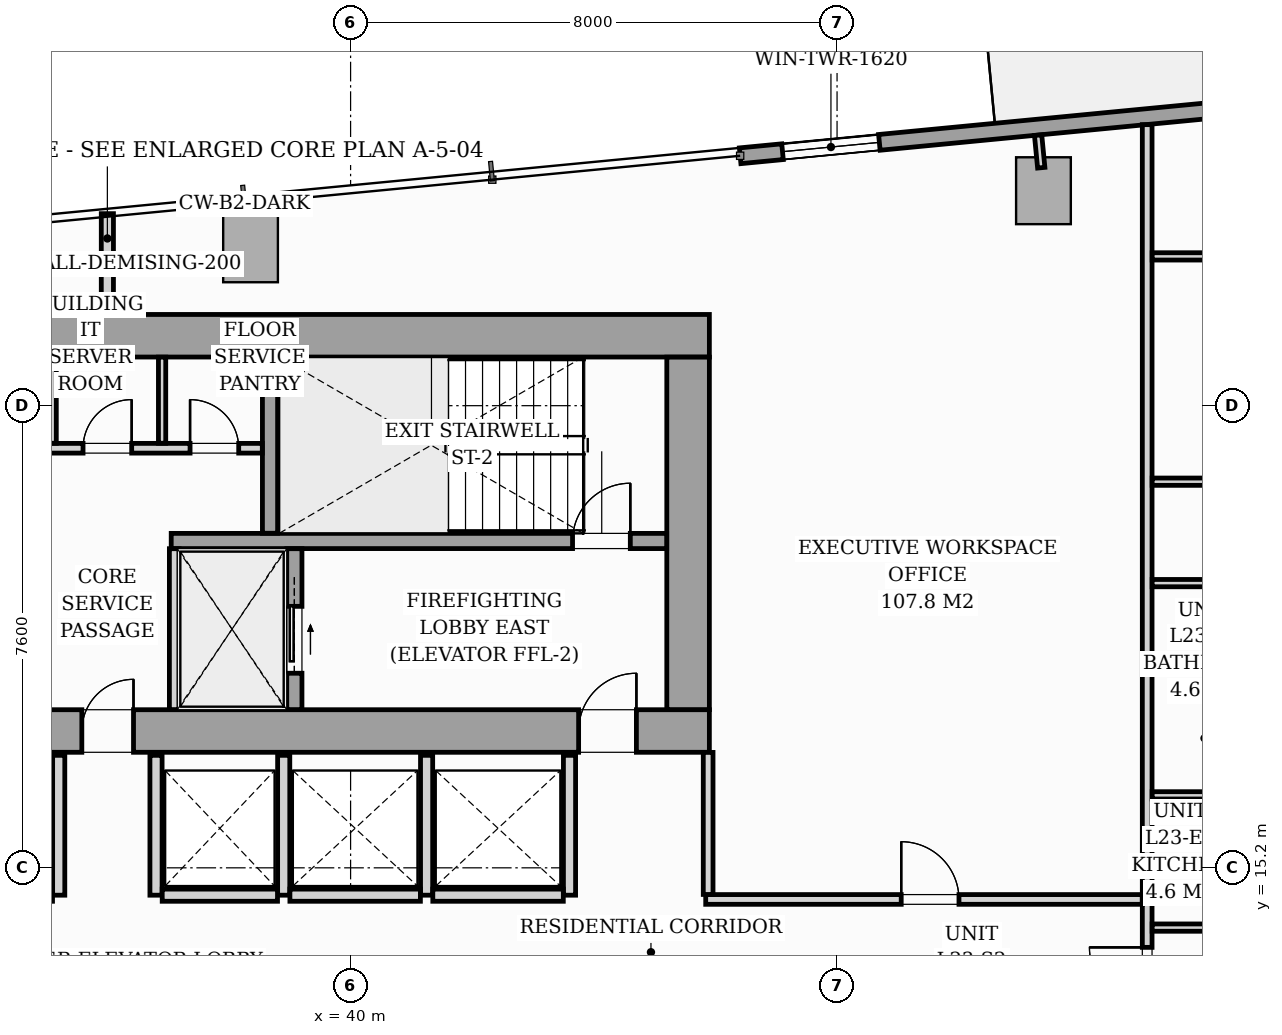
"""IFC4 building model, lengths in metres.
Left out: names, types, materials, properties, quantities, classifications, styles, units other than length and angle.
Written with IfcOpenShell. Run it as: python <this file> out.ifc"""

import sys

from ifc_helpers import new_model, si_unit, direction, frame, frame_2d, origin, origin_2d, place, context, subcontext, project, spatial, rectangle, i_section, extrude, source, transform, mapped, element, fill, save


model = new_model("IFC4")
c1 = context("Model", 3, precision=1e-05, world=origin(), true_north=direction((0.0, 1.0)))
c2 = subcontext(c1, "Body", "Model", "MODEL_VIEW")
j1 = project(units=[si_unit("LENGTHUNIT", "METRE"), si_unit("PLANEANGLEUNIT", "RADIAN")], contexts=[c1])
p1 = place(None, origin())
s1 = spatial("IfcSite", under=j1, at=p1, CompositionType="ELEMENT")
p2 = place(p1, origin())
s2 = spatial("IfcBuilding", under=s1, at=p2, CompositionType="ELEMENT")
p3 = place(p2, frame((0.0, 0.0, 84.2)))
s3 = spatial("IfcBuildingStorey", under=s2, at=p3, CompositionType="ELEMENT", Elevation=84.2)
m1 = source(origin(), c2, "Body", "SweptSolid", [
    extrude(i_section(OverallWidth=0.427, OverallDepth=0.483, WebThickness=0.051, FlangeThickness=0.082, FilletRadius=0.018, at=origin_2d()), origin(), (0.0, 0.0, 1.0), 3.196),
])
for number, where, z_axis, x_axis in (
    (1, (38.88, 17.4, 0.002), (0.0, 0.0, 1.0), (1.0, 0.0, 0.0)),
    (2, (45.6, 17.4, 0.002), (0.0, 0.0, 1.0), (1.0, 0.0, 0.0)),
    (3, (38.88, 24.0, 0.002), (0.0, 0.0, 1.0), (1.0, 0.0, 0.0)),
    (4, (45.6, 24.0, 0.002), (0.0, 0.0, 1.0), (1.0, 0.0, 0.0)),
):
    element("IfcColumn", number, at=place(p3, frame(where, z_axis=z_axis, x_axis=x_axis)), inside=s3, PredefinedType="PILASTER", context=c2, shape_type="MappedRepresentation", body=[
        mapped(m1, transform((0.0, 0.0, 0.0), scale=1.0)),
    ])
m2 = source(origin(), c2, "Body", "SweptSolid", [
    extrude(rectangle(XDim=0.9, YDim=1.1, at=origin_2d()), origin(), (0.0, 0.0, 1.0), 3.196),
])
for number, where, z_axis, x_axis in (
    (5, (38.354, 25.38, 0.002), (0.0, 0.0, 1.0), (0.995, 0.096, 0.0)),
    (6, (51.394, 26.335, 0.002), (0.0, 0.0, 1.0), (0.995, 0.096, 0.0)),
):
    element("IfcColumn", number, at=place(p3, frame(where, z_axis=z_axis, x_axis=x_axis)), inside=s3, PredefinedType="COLUMN", context=c2, shape_type="MappedRepresentation", body=[
        mapped(m2, transform((0.0, 0.0, 0.0), scale=1.0)),
    ])
p4 = place(p3, frame((46.406, 26.91, 0.0), z_axis=(0.0, 0.0, 1.0), x_axis=(0.995396638587, 0.095841180552, 0.0)))
e7 = element("IfcWall", 7, at=p4, inside=s3, PredefinedType="STANDARD", context=c2, shape_type="SweptSolid", body=[
    extrude(rectangle(XDim=19.11, YDim=0.26, at=frame_2d((9.555, 0.0))), origin(), (0.0, 0.0, 1.0), 2.94),
])
p5 = place(p4, frame((9.6, 0.0, 0.0)))
e8 = element("IfcOpeningElement", 8, at=p5, cuts=e7, PredefinedType="OPENING", context=c2, shape_type="SweptSolid", body=[
    extrude(rectangle(XDim=1.8, YDim=2.06, at=frame_2d((0.9, 1.03))), frame((0.0, 0.14, 0.0), z_axis=(0.0, -1.0, 0.0), x_axis=(1.0, 0.0, 0.0)), (0.0, 0.0, 1.0), 0.28),
])
p6 = place(p4, frame((0.7, 0.0, 0.65)))
e9 = element("IfcOpeningElement", 9, at=p6, cuts=e7, PredefinedType="OPENING", context=c2, shape_type="SweptSolid", body=[
    extrude(rectangle(XDim=1.6, YDim=1.5, at=frame_2d((0.8, 0.75))), frame((0.0, 0.14, 0.0), z_axis=(0.0, -1.0, 0.0), x_axis=(1.0, 0.0, 0.0)), (0.0, 0.0, 1.0), 0.28),
])
p7 = place(p3, frame((26.1, 17.45, 0.0), z_axis=(0.0, 0.0, 1.0), x_axis=(1.0, 0.0, 0.0)))
e10 = element("IfcWall", 10, at=p7, inside=s3, PredefinedType="SHEAR", context=c2, shape_type="SweptSolid", body=[
    extrude(rectangle(XDim=19.8, YDim=0.7, at=frame_2d((9.9, 0.0))), origin(), (0.0, 0.0, 1.0), 3.2),
])
p8 = place(p7, frame((1.05, 0.0, 0.0)))
e11 = element("IfcOpeningElement", 11, at=p8, cuts=e10, PredefinedType="OPENING", context=c2, shape_type="SweptSolid", body=[
    extrude(rectangle(XDim=0.95, YDim=2.06, at=frame_2d((0.475, 1.03))), frame((0.0, 0.36, 0.0), z_axis=(0.0, -1.0, 0.0), x_axis=(1.0, 0.0, 0.0)), (0.0, 0.0, 1.0), 0.72),
])
p9 = place(p7, frame((9.48, 0.0, 0.0)))
e12 = element("IfcOpeningElement", 12, at=p9, cuts=e10, PredefinedType="OPENING", context=c2, shape_type="SweptSolid", body=[
    extrude(rectangle(XDim=0.85, YDim=2.0, at=frame_2d((0.425, 1.0))), frame((0.0, 0.36, 0.0), z_axis=(0.0, -1.0, 0.0), x_axis=(1.0, 0.0, 0.0)), (0.0, 0.0, 1.0), 0.72),
])
p10 = place(p7, frame((17.65, 0.0, 0.0)))
e13 = element("IfcOpeningElement", 13, at=p10, cuts=e10, PredefinedType="OPENING", context=c2, shape_type="SweptSolid", body=[
    extrude(rectangle(XDim=0.95, YDim=2.06, at=frame_2d((0.475, 1.03))), frame((0.0, 0.36, 0.0), z_axis=(0.0, -1.0, 0.0), x_axis=(1.0, 0.0, 0.0)), (0.0, 0.0, 1.0), 0.72),
])
p11 = place(p3, frame((26.1, 23.95, 0.0), z_axis=(0.0, 0.0, 1.0), x_axis=(1.0, 0.0, 0.0)))
e14 = element("IfcWall", 14, at=p11, inside=s3, PredefinedType="SHEAR", context=c2, shape_type="SweptSolid", body=[
    extrude(rectangle(XDim=19.8, YDim=0.7, at=frame_2d((9.9, 0.0))), origin(), (0.0, 0.0, 1.0), 3.2),
])
p12 = place(p3, frame((45.55, 17.802, 0.0), z_axis=(0.0, 0.0, 1.0), x_axis=(0.0, 1.0, 0.0)))
e15 = element("IfcWall", 15, at=p12, inside=s3, PredefinedType="SHEAR", context=c2, shape_type="SweptSolid", body=[
    extrude(rectangle(XDim=5.796, YDim=0.7, at=frame_2d((2.898, 0.0))), origin(), (0.0, 0.0, 1.0), 3.2),
])
p13 = place(p3, frame((37.05, 20.575, 0.0), z_axis=(0.0, 0.0, 1.0), x_axis=(1.0, 0.0, 0.0)))
e16 = element("IfcWall", 16, at=p13, inside=s3, PredefinedType="SOLIDWALL", context=c2, shape_type="SweptSolid", body=[
    extrude(rectangle(XDim=8.148, YDim=0.25, at=frame_2d((4.074, 0.0))), origin(), (0.0, 0.0, 1.0), 3.2),
])
p14 = place(p13, frame((6.6, 0.0, 0.0)))
e17 = element("IfcOpeningElement", 17, at=p14, cuts=e16, PredefinedType="OPENING", context=c2, shape_type="SweptSolid", body=[
    extrude(rectangle(XDim=0.95, YDim=2.06, at=frame_2d((0.475, 1.03))), frame((0.0, 0.135, 0.0), z_axis=(0.0, -1.0, 0.0), x_axis=(1.0, 0.0, 0.0)), (0.0, 0.0, 1.0), 0.27),
])
p15 = place(p3, frame((38.675, 20.702, 0.0), z_axis=(0.0, 0.0, 1.0), x_axis=(0.0, 1.0, 0.0)))
e18 = element("IfcWall", 18, at=p15, inside=s3, PredefinedType="SOLIDWALL", context=c2, shape_type="SweptSolid", body=[
    extrude(rectangle(XDim=2.896, YDim=0.25, at=frame_2d((1.448, 0.0))), origin(), (0.0, 0.0, 1.0), 3.2),
])
p16 = place(p3, frame((37.1, 17.802, 0.0), z_axis=(0.0, 0.0, 1.0), x_axis=(0.0, 1.0, 0.0)))
e19 = element("IfcWall", 19, at=p16, inside=s3, PredefinedType="PARTITIONING", context=c2, shape_type="SweptSolid", body=[
    extrude(rectangle(XDim=2.646, YDim=0.16, at=frame_2d((1.323, 0.0))), origin(), (0.0, 0.0, 1.0), 2.94),
])
p17 = place(p3, frame((39.075, 17.802, 0.0), z_axis=(0.0, 0.0, 1.0), x_axis=(0.0, 1.0, 0.0)))
e20 = element("IfcWall", 20, at=p17, inside=s3, PredefinedType="SOLIDWALL", context=c2, shape_type="SweptSolid", body=[
    extrude(rectangle(XDim=2.646, YDim=0.25, at=frame_2d((1.323, 0.0))), origin(), (0.0, 0.0, 1.0), 3.2),
])
p18 = place(p17, frame((0.598, 0.0, 0.0)))
e21 = element("IfcOpeningElement", 21, at=p18, cuts=e20, PredefinedType="OPENING", context=c2, shape_type="SweptSolid", body=[
    extrude(rectangle(XDim=1.1, YDim=2.08, at=frame_2d((0.55, 1.04))), frame((0.0, 0.135, 0.0), z_axis=(0.0, -1.0, 0.0), x_axis=(1.0, 0.0, 0.0)), (0.0, 0.0, 1.0), 0.27),
])
p19 = place(p3, frame((33.452, 22.1, 0.0), z_axis=(0.0, 0.0, 1.0), x_axis=(1.0, 0.0, 0.0)))
e22 = element("IfcWall", 22, at=p19, inside=s3, PredefinedType="PARTITIONING", context=c2, shape_type="SweptSolid", body=[
    extrude(rectangle(XDim=5.096, YDim=0.16, at=frame_2d((2.548, 0.0))), origin(), (0.0, 0.0, 1.0), 2.94),
])
p20 = place(p19, frame((0.388, 0.0, 0.0)))
e23 = element("IfcOpeningElement", 23, at=p20, cuts=e22, PredefinedType="OPENING", context=c2, shape_type="SweptSolid", body=[
    extrude(rectangle(XDim=0.8, YDim=2.05, at=frame_2d((0.4, 1.025))), frame((0.0, 0.09, 0.0), z_axis=(0.0, -1.0, 0.0), x_axis=(1.0, 0.0, 0.0)), (0.0, 0.0, 1.0), 0.18),
])
p21 = place(p19, frame((2.148, 0.0, 0.0)))
e24 = element("IfcOpeningElement", 24, at=p21, cuts=e22, PredefinedType="OPENING", context=c2, shape_type="SweptSolid", body=[
    extrude(rectangle(XDim=0.8, YDim=2.05, at=frame_2d((0.4, 1.025))), frame((0.0, 0.09, 0.0), z_axis=(0.0, -1.0, 0.0), x_axis=(1.0, 0.0, 0.0)), (0.0, 0.0, 1.0), 0.18),
])
p22 = place(p19, frame((3.908, 0.0, 0.0)))
e25 = element("IfcOpeningElement", 25, at=p22, cuts=e22, PredefinedType="OPENING", context=c2, shape_type="SweptSolid", body=[
    extrude(rectangle(XDim=0.8, YDim=2.05, at=frame_2d((0.4, 1.025))), frame((0.0, 0.09, 0.0), z_axis=(0.0, -1.0, 0.0), x_axis=(1.0, 0.0, 0.0)), (0.0, 0.0, 1.0), 0.18),
])
for number, where, z_axis, x_axis in (
    (26, (35.1, 22.182, 0.0), (0.0, 0.0, 1.0), (0.0, 1.0, 0.0)),
    (27, (36.9, 22.182, 0.0), (0.0, 0.0, 1.0), (0.0, 1.0, 0.0)),
):
    element("IfcWall", number, at=place(p3, frame(where, z_axis=z_axis, x_axis=x_axis)), inside=s3, PredefinedType="PARTITIONING", context=c2, shape_type="SweptSolid", body=[
        extrude(rectangle(XDim=1.416, YDim=0.12, at=frame_2d((0.708, 0.0))), origin(), (0.0, 0.0, 1.0), 2.94),
    ])
for number, where, z_axis, x_axis in (
    (28, (35.2, 14.75, 0.0), (0.0, 0.0, 1.0), (0.0, 1.0, 0.0)),
    (29, (36.8, 14.75, 0.0), (0.0, 0.0, 1.0), (0.0, 1.0, 0.0)),
    (30, (38.9, 14.75, 0.0), (0.0, 0.0, 1.0), (0.0, 1.0, 0.0)),
):
    element("IfcWall", number, at=place(p3, frame(where, z_axis=z_axis, x_axis=x_axis)), inside=s3, PredefinedType="PARTITIONING", context=c2, shape_type="SweptSolid", body=[
        extrude(rectangle(XDim=2.3, YDim=0.2, at=frame_2d((1.15, 0.0))), origin(), (0.0, 0.0, 1.0), 2.94),
    ])
p23 = place(p3, frame((36.902, 14.75, 0.0), z_axis=(0.0, 0.0, 1.0), x_axis=(1.0, 0.0, 0.0)))
e31 = element("IfcWall", 31, at=p23, inside=s3, PredefinedType="PARTITIONING", context=c2, shape_type="SweptSolid", body=[
    extrude(rectangle(XDim=1.896, YDim=0.2, at=frame_2d((0.948, 0.0))), origin(), (0.0, 0.0, 1.0), 2.94),
])
for number, where, z_axis, x_axis in (
    (32, (41.25, 14.75, 0.0), (0.0, 0.0, 1.0), (0.0, 1.0, 0.0)),
    (33, (43.6, 14.75, 0.0), (0.0, 0.0, 1.0), (0.0, 1.0, 0.0)),
):
    element("IfcWall", number, at=place(p3, frame(where, z_axis=z_axis, x_axis=x_axis)), inside=s3, PredefinedType="PARTITIONING", context=c2, shape_type="SweptSolid", body=[
        extrude(rectangle(XDim=2.3, YDim=0.2, at=frame_2d((1.15, 0.0))), origin(), (0.0, 0.0, 1.0), 2.94),
    ])
for number, where, z_axis, x_axis in (
    (34, (39.002, 14.75, 0.0), (0.0, 0.0, 1.0), (1.0, 0.0, 0.0)),
    (35, (41.352, 14.75, 0.0), (0.0, 0.0, 1.0), (1.0, 0.0, 0.0)),
):
    element("IfcWall", number, at=place(p3, frame(where, z_axis=z_axis, x_axis=x_axis)), inside=s3, PredefinedType="PARTITIONING", context=c2, shape_type="SweptSolid", body=[
        extrude(rectangle(XDim=2.146, YDim=0.2, at=frame_2d((1.073, 0.0))), origin(), (0.0, 0.0, 1.0), 2.94),
    ])
p24 = place(p3, frame((53.1, 12.572, 0.0), z_axis=(0.0, 0.0, 1.0), x_axis=(0.0, 1.0, 0.0)))
e36 = element("IfcWall", 36, at=p24, inside=s3, PredefinedType="PARTITIONING", context=c2, shape_type="SweptSolid", body=[
    extrude(rectangle(XDim=14.849, YDim=0.16, at=frame_2d((7.425, 0.0))), origin(), (0.0, 0.0, 1.0), 2.94),
])
p25 = place(p24, frame((0.37, 0.0, 0.0)))
e37 = element("IfcOpeningElement", 37, at=p25, cuts=e36, PredefinedType="OPENING", context=c2, shape_type="SweptSolid", body=[
    extrude(rectangle(XDim=0.95, YDim=2.06, at=frame_2d((0.475, 1.03))), frame((0.0, 0.09, 0.0), z_axis=(0.0, -1.0, 0.0), x_axis=(1.0, 0.0, 0.0)), (0.0, 0.0, 1.0), 0.18),
])
p26 = place(p3, frame((36.0, 24.302, 0.0), z_axis=(0.0, 0.0, 1.0), x_axis=(0.0, 1.0, 0.0)))
e38 = element("IfcWall", 38, at=p26, inside=s3, PredefinedType="PARTITIONING", context=c2, shape_type="SweptSolid", body=[
    extrude(rectangle(XDim=1.656, YDim=0.2, at=frame_2d((0.828, 0.0))), origin(), (0.0, 0.0, 1.0), 2.94),
])
for number, where, z_axis, x_axis in (
    (39, (53.182, 16.392, 0.0), (0.0, 0.0, 1.0), (1.0, 0.0, 0.0)),
    (40, (53.182, 14.217, 0.0), (0.0, 0.0, 1.0), (1.0, 0.0, 0.0)),
    (41, (53.182, 18.567, 0.0), (0.0, 0.0, 1.0), (1.0, 0.0, 0.0)),
):
    element("IfcWall", number, at=place(p3, frame(where, z_axis=z_axis, x_axis=x_axis)), inside=s3, PredefinedType="PARTITIONING", context=c2, shape_type="SweptSolid", body=[
        extrude(rectangle(XDim=2.256, YDim=0.12, at=frame_2d((1.128, 0.0))), origin(), (0.0, 0.0, 1.0), 2.94),
    ])
p27 = place(p3, frame((53.182, 25.255, 0.0), z_axis=(0.0, 0.0, 1.0), x_axis=(1.0, 0.0, 0.0)))
e42 = element("IfcWall", 42, at=p27, inside=s3, PredefinedType="PARTITIONING", context=c2, shape_type="SweptSolid", body=[
    extrude(rectangle(XDim=7.451, YDim=0.12, at=frame_2d((3.726, 0.0))), origin(), (0.0, 0.0, 1.0), 2.94),
])
p28 = place(p27, frame((3.331, 0.0, 0.0)))
e43 = element("IfcOpeningElement", 43, at=p28, cuts=e42, PredefinedType="OPENING", context=c2, shape_type="SweptSolid", body=[
    extrude(rectangle(XDim=0.85, YDim=2.05, at=frame_2d((0.425, 1.025))), frame((0.0, 0.07, 0.0), z_axis=(0.0, -1.0, 0.0), x_axis=(1.0, 0.0, 0.0)), (0.0, 0.0, 1.0), 0.14),
])
p29 = place(p3, frame((53.182, 21.55, 0.0), z_axis=(0.0, 0.0, 1.0), x_axis=(1.0, 0.0, 0.0)))
e44 = element("IfcWall", 44, at=p29, inside=s3, PredefinedType="PARTITIONING", context=c2, shape_type="SweptSolid", body=[
    extrude(rectangle(XDim=15.37, YDim=0.12, at=frame_2d((7.685, 0.0))), origin(), (0.0, 0.0, 1.0), 2.94),
])
p30 = place(p29, frame((5.223, 0.0, 0.0)))
e45 = element("IfcOpeningElement", 45, at=p30, cuts=e44, PredefinedType="OPENING", context=c2, shape_type="SweptSolid", body=[
    extrude(rectangle(XDim=0.85, YDim=2.05, at=frame_2d((0.425, 1.025))), frame((0.0, 0.07, 0.0), z_axis=(0.0, -1.0, 0.0), x_axis=(1.0, 0.0, 0.0)), (0.0, 0.0, 1.0), 0.14),
])
p31 = place(p3, frame((53.182, 19.882, 0.0), z_axis=(0.0, 0.0, 1.0), x_axis=(1.0, 0.0, 0.0)))
e46 = element("IfcWall", 46, at=p31, inside=s3, PredefinedType="PARTITIONING", context=c2, shape_type="SweptSolid", body=[
    extrude(rectangle(XDim=15.531, YDim=0.12, at=frame_2d((7.765, 0.0))), origin(), (0.0, 0.0, 1.0), 2.94),
])
p32 = place(p31, frame((5.223, 0.0, 0.0)))
e47 = element("IfcOpeningElement", 47, at=p32, cuts=e46, PredefinedType="OPENING", context=c2, shape_type="SweptSolid", body=[
    extrude(rectangle(XDim=0.85, YDim=2.05, at=frame_2d((0.425, 1.025))), frame((0.0, 0.07, 0.0), z_axis=(0.0, -1.0, 0.0), x_axis=(1.0, 0.0, 0.0)), (0.0, 0.0, 1.0), 0.14),
])
p33 = place(p3, frame((45.84, 14.68, 0.0), z_axis=(0.0, 0.0, 1.0), x_axis=(1.0, 0.0, 0.0)))
e48 = element("IfcWall", 48, at=p33, inside=s3, PredefinedType="PARTITIONING", context=c2, shape_type="SweptSolid", body=[
    extrude(rectangle(XDim=7.178, YDim=0.16, at=frame_2d((3.589, 0.0))), origin(), (0.0, 0.0, 1.0), 2.94),
])
p34 = place(p33, frame((3.215, 0.0, 0.0)))
e49 = element("IfcOpeningElement", 49, at=p34, cuts=e48, PredefinedType="OPENING", context=c2, shape_type="SweptSolid", body=[
    extrude(rectangle(XDim=0.95, YDim=2.06, at=frame_2d((0.475, 1.03))), frame((0.0, 0.09, 0.0), z_axis=(0.0, -1.0, 0.0), x_axis=(1.0, 0.0, 0.0)), (0.0, 0.0, 1.0), 0.18),
])
p35 = place(p3, frame((45.88, 14.762, 0.0), z_axis=(0.0, 0.0, 1.0), x_axis=(0.0, 1.0, 0.0)))
e50 = element("IfcWall", 50, at=p35, inside=s3, PredefinedType="PARTITIONING", context=c2, shape_type="SweptSolid", body=[
    extrude(rectangle(XDim=2.336, YDim=0.16, at=frame_2d((1.168, 0.0))), origin(), (0.0, 0.0, 1.0), 2.94),
])
p36 = place(p3, frame((51.358, 26.713, 0.0), z_axis=(0.0, 0.0, 1.0), x_axis=(-0.095772948675, 0.995403205893, 0.0)))
e51 = element("IfcWall", 51, at=p36, inside=s3, PredefinedType="PARTITIONING", context=c2, shape_type="SweptSolid", body=[
    extrude(rectangle(XDim=0.538, YDim=0.12, at=frame_2d((0.269, 0.0))), origin(), (0.0, 0.0, 1.0), 2.94),
])
m3 = source(origin(), c2, "Body", "SweptSolid", [
    extrude(rectangle(XDim=1.6, YDim=1.5, at=frame_2d((0.8, 0.75))), frame((0.0, 0.03, 0.0), z_axis=(0.0, -1.0, 0.0), x_axis=(1.0, 0.0, 0.0)), (0.0, 0.0, 1.0), 0.06),
])
p37 = place(p6, origin())
e52 = element("IfcWindow", 52, at=p37, inside=s3, PartitioningType="SINGLE_PANEL", PredefinedType="WINDOW", context=c2, shape_type="MappedRepresentation", body=[
    mapped(m3, transform((0.0, 0.0, 0.0), scale=1.0)),
])
fill(e9, e52)
m4 = source(origin(), c2, "Body", "SweptSolid", [
    extrude(rectangle(XDim=0.85, YDim=2.0, at=frame_2d((0.425, 1.0))), frame((0.0, 0.025, 0.0), z_axis=(0.0, -1.0, 0.0), x_axis=(1.0, 0.0, 0.0)), (0.0, 0.0, 1.0), 0.05),
])
p38 = place(p9, origin())
e53 = element("IfcDoor", 53, at=p38, inside=s3, OperationType="SINGLE_SWING_RIGHT", PredefinedType="DOOR", context=c2, shape_type="MappedRepresentation", body=[
    mapped(m4, transform((0.0, 0.0, 0.0), scale=1.0)),
])
fill(e12, e53)
m5 = source(origin(), c2, "Body", "SweptSolid", [
    extrude(rectangle(XDim=0.95, YDim=2.06, at=frame_2d((0.475, 1.03))), frame((0.0, 0.025, 0.0), z_axis=(0.0, -1.0, 0.0), x_axis=(1.0, 0.0, 0.0)), (0.0, 0.0, 1.0), 0.05),
])
p39 = place(p10, origin())
e54 = element("IfcDoor", 54, at=p39, inside=s3, OperationType="SINGLE_SWING_RIGHT", PredefinedType="DOOR", context=c2, shape_type="MappedRepresentation", body=[
    mapped(m5, transform((0.0, 0.0, 0.0), scale=1.0)),
])
fill(e13, e54)
p40 = place(p14, origin())
e55 = element("IfcDoor", 55, at=p40, inside=s3, OperationType="SINGLE_SWING_RIGHT", PredefinedType="DOOR", context=c2, shape_type="MappedRepresentation", body=[
    mapped(m5, transform((0.0, 0.0, 0.0), scale=1.0)),
])
fill(e17, e55)
m6 = source(origin(), c2, "Body", "SweptSolid", [
    extrude(rectangle(XDim=1.1, YDim=2.08, at=frame_2d((0.55, 1.04))), frame((0.0, 0.025, 0.0), z_axis=(0.0, -1.0, 0.0), x_axis=(1.0, 0.0, 0.0)), (0.0, 0.0, 1.0), 0.05),
])
p41 = place(p18, origin())
e56 = element("IfcDoor", 56, at=p41, inside=s3, OperationType="SLIDING_TO_RIGHT", PredefinedType="DOOR", context=c2, shape_type="MappedRepresentation", body=[
    mapped(m6, transform((0.0, 0.0, 0.0), scale=1.0)),
])
fill(e21, e56)
m7 = source(origin(), c2, "Body", "SweptSolid", [
    extrude(rectangle(XDim=0.8, YDim=2.05, at=frame_2d((0.4, 1.025))), frame((0.0, 0.025, 0.0), z_axis=(0.0, -1.0, 0.0), x_axis=(1.0, 0.0, 0.0)), (0.0, 0.0, 1.0), 0.05),
])
p42 = place(p21, origin())
e57 = element("IfcDoor", 57, at=p42, inside=s3, OperationType="SINGLE_SWING_RIGHT", PredefinedType="DOOR", context=c2, shape_type="MappedRepresentation", body=[
    mapped(m7, transform((0.0, 0.0, 0.0), scale=1.0)),
])
fill(e24, e57)
p43 = place(p22, origin())
e58 = element("IfcDoor", 58, at=p43, inside=s3, OperationType="SINGLE_SWING_LEFT", PredefinedType="DOOR", context=c2, shape_type="MappedRepresentation", body=[
    mapped(m7, transform((0.0, 0.0, 0.0), scale=1.0)),
])
fill(e25, e58)
m8 = source(origin(), c2, "Body", "SweptSolid", [
    extrude(rectangle(XDim=0.95, YDim=2.06, at=frame_2d((0.475, 1.03))), frame((0.0, 0.025, 0.0), z_axis=(0.0, -1.0, 0.0), x_axis=(1.0, 0.0, 0.0)), (0.0, 0.0, 1.0), 0.05),
])
p44 = place(p25, origin())
e59 = element("IfcDoor", 59, at=p44, inside=s3, OperationType="SINGLE_SWING_RIGHT", PredefinedType="DOOR", context=c2, shape_type="MappedRepresentation", body=[
    mapped(m8, transform((0.0, 0.0, 0.0), scale=1.0)),
])
fill(e37, e59)
p45 = place(p34, origin())
e60 = element("IfcDoor", 60, at=p45, inside=s3, OperationType="SINGLE_SWING_LEFT", PredefinedType="DOOR", context=c2, shape_type="MappedRepresentation", body=[
    mapped(m8, transform((0.0, 0.0, 0.0), scale=1.0)),
])
fill(e49, e60)
save(model, sys.argv[1])
